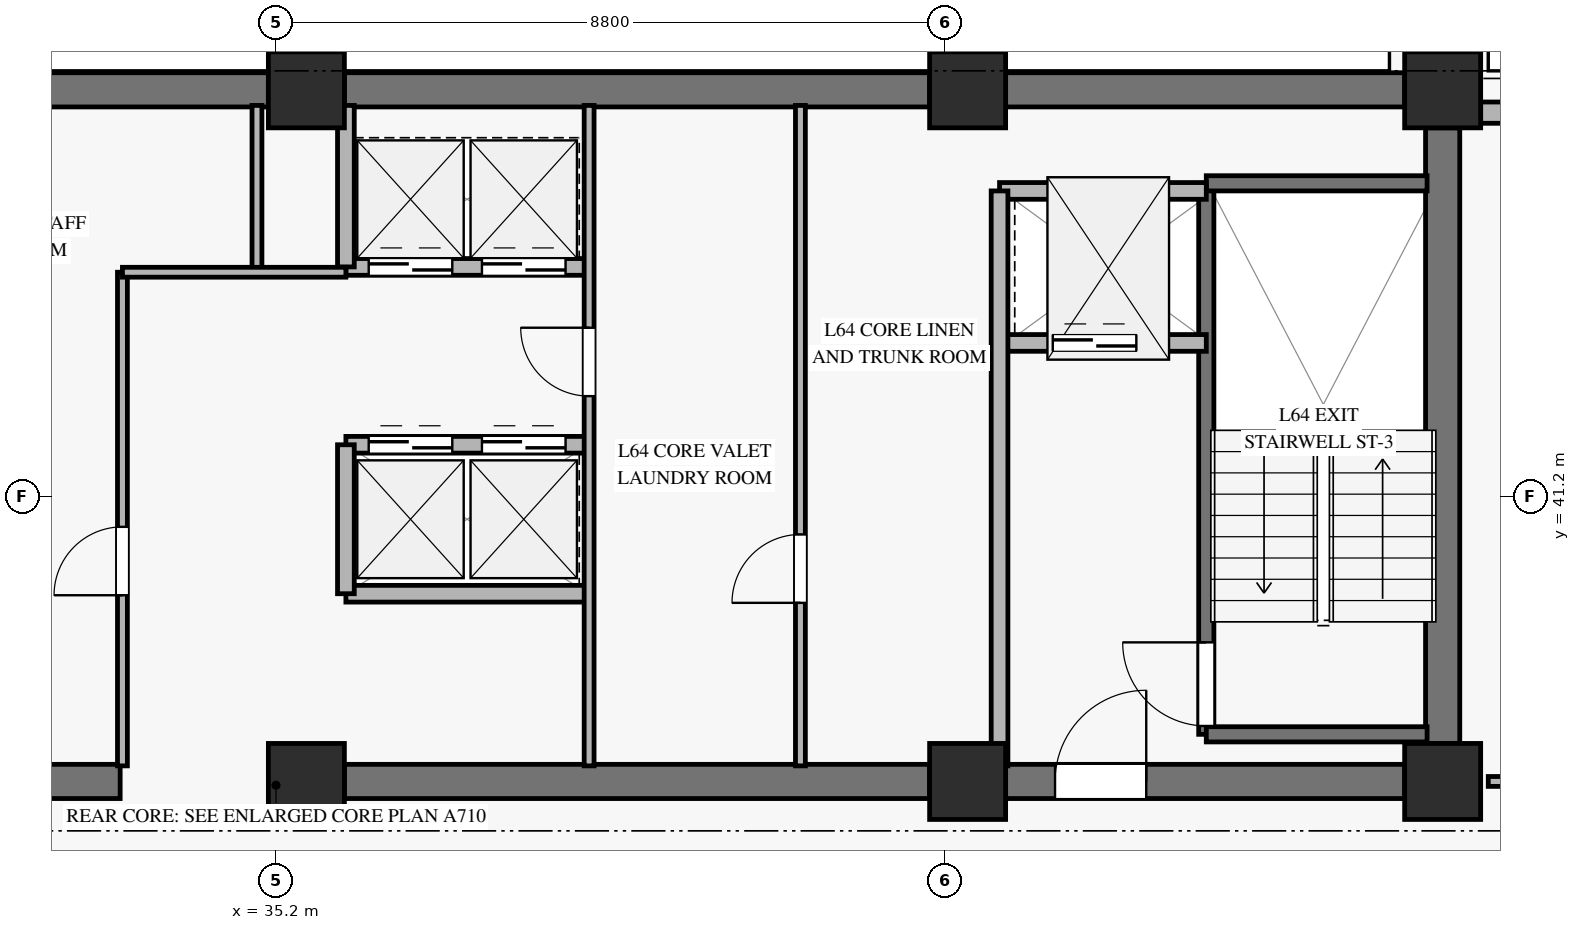
"""IFC4 building model, lengths in metres.
Left out: names, types, materials, properties, quantities, classifications, styles, units other than length and angle.
Written with IfcOpenShell. Run it as: python <this file> out.ifc"""

import sys

from ifc_helpers import new_model, si_unit, direction, frame, frame_2d, origin, origin_2d, place, context, subcontext, project, spatial, rectangle, extrude, source, transform, mapped, element, fill, save


model = new_model("IFC4")
c1 = context("Model", 3, precision=1e-05, world=origin(), true_north=direction((0.0, 1.0)))
c2 = subcontext(c1, "Body", "Model", "MODEL_VIEW")
j1 = project(units=[si_unit("LENGTHUNIT", "METRE"), si_unit("PLANEANGLEUNIT", "RADIAN")], contexts=[c1])
p1 = place(None, origin())
s1 = spatial("IfcSite", under=j1, at=p1, CompositionType="ELEMENT")
p2 = place(p1, origin())
s2 = spatial("IfcBuilding", under=s1, at=p2, CompositionType="ELEMENT")
p3 = place(p2, frame((0.0, 0.0, 251.9)))
s3 = spatial("IfcBuildingStorey", under=s2, at=p3, CompositionType="ELEMENT", Elevation=251.9)
m1 = source(origin(), c2, "Body", "SweptSolid", [
    extrude(rectangle(XDim=1.0, YDim=1.0, at=origin_2d()), origin(), (0.0, 0.0, 1.0), 3.185),
])
for number, where, z_axis, x_axis in (
    (1, (35.6, 37.45, 0.0), (0.0, 0.0, 1.0), (1.0, 0.0, 0.0)),
    (2, (35.6, 46.55, 0.0), (0.0, 0.0, 1.0), (1.0, 0.0, 0.0)),
    (3, (44.3, 37.45, 0.0), (0.0, 0.0, 1.0), (1.0, 0.0, 0.0)),
    (4, (44.3, 46.55, 0.0), (0.0, 0.0, 1.0), (1.0, 0.0, 0.0)),
    (5, (50.55, 37.45, 0.0), (0.0, 0.0, 1.0), (1.0, 0.0, 0.0)),
    (6, (50.55, 46.55, 0.0), (0.0, 0.0, 1.0), (1.0, 0.0, 0.0)),
):
    element("IfcColumn", number, at=place(p3, frame(where, z_axis=z_axis, x_axis=x_axis)), inside=s3, PredefinedType="PILASTER", context=c2, shape_type="MappedRepresentation", body=[
        mapped(m1, transform((0.0, 0.0, 0.0), x_axis=(1.0, 0.0, 0.0), y_axis=(0.0, 1.0, 0.0), z_axis=(0.0, 0.0, 1.0), scale=1.0)),
    ])
p4 = place(p3, frame((31.3, 46.55, 0.0), z_axis=(0.0, 0.0, 1.0), x_axis=(1.0, 0.0, 0.0)))
e7 = element("IfcWall", 7, at=p4, inside=s3, PredefinedType="SHEAR", context=c2, shape_type="SweptSolid", body=[
    extrude(rectangle(XDim=3.8, YDim=0.45, at=frame_2d((1.9, 0.0))), origin(), (0.0, 0.0, 1.0), 3.185),
])
p5 = place(p3, frame((36.1, 46.55, 0.0), z_axis=(0.0, 0.0, 1.0), x_axis=(1.0, 0.0, 0.0)))
e8 = element("IfcWall", 8, at=p5, inside=s3, PredefinedType="SHEAR", context=c2, shape_type="SweptSolid", body=[
    extrude(rectangle(XDim=7.7, YDim=0.45, at=frame_2d((3.85, 0.0))), origin(), (0.0, 0.0, 1.0), 3.185),
])
p6 = place(p3, frame((44.8, 46.55, 0.0), z_axis=(0.0, 0.0, 1.0), x_axis=(1.0, 0.0, 0.0)))
e9 = element("IfcWall", 9, at=p6, inside=s3, PredefinedType="SHEAR", context=c2, shape_type="SweptSolid", body=[
    extrude(rectangle(XDim=5.25, YDim=0.45, at=frame_2d((2.625, 0.0))), origin(), (0.0, 0.0, 1.0), 3.185),
])
p7 = place(p3, frame((31.3, 37.45, 0.0), z_axis=(0.0, 0.0, 1.0), x_axis=(1.0, 0.0, 0.0)))
e10 = element("IfcWall", 10, at=p7, inside=s3, PredefinedType="SHEAR", context=c2, shape_type="SweptSolid", body=[
    extrude(rectangle(XDim=1.85, YDim=0.45, at=frame_2d((0.925, 0.0))), origin(), (0.0, 0.0, 1.0), 3.185),
])
p8 = place(p3, frame((36.1, 37.45, 0.0), z_axis=(0.0, 0.0, 1.0), x_axis=(1.0, 0.0, 0.0)))
e11 = element("IfcWall", 11, at=p8, inside=s3, PredefinedType="SHEAR", context=c2, shape_type="SweptSolid", body=[
    extrude(rectangle(XDim=7.7, YDim=0.45, at=frame_2d((3.85, 0.0))), origin(), (0.0, 0.0, 1.0), 3.185),
])
p9 = place(p3, frame((44.8, 37.45, 0.0), z_axis=(0.0, 0.0, 1.0), x_axis=(1.0, 0.0, 0.0)))
e12 = element("IfcWall", 12, at=p9, inside=s3, PredefinedType="SHEAR", context=c2, shape_type="SweptSolid", body=[
    extrude(rectangle(XDim=5.25, YDim=0.45, at=frame_2d((2.625, 0.0))), origin(), (0.0, 0.0, 1.0), 3.185),
])
p10 = place(p9, frame((0.65, 0.0, 0.0)))
e13 = element("IfcOpeningElement", 13, at=p10, cuts=e12, PredefinedType="OPENING", context=c2, shape_type="SweptSolid", body=[
    extrude(rectangle(XDim=1.2, YDim=2.15, at=frame_2d((0.6, 1.075))), frame((0.0, 0.235, 0.0), z_axis=(0.0, -1.0, 0.0), x_axis=(1.0, 0.0, 0.0)), (0.0, 0.0, 1.0), 0.47),
])
p11 = place(p3, frame((50.55, 37.95, 0.0), z_axis=(0.0, 0.0, 1.0), x_axis=(0.0, 1.0, 0.0)))
e14 = element("IfcWall", 14, at=p11, inside=s3, PredefinedType="SHEAR", context=c2, shape_type="SweptSolid", body=[
    extrude(rectangle(XDim=8.1, YDim=0.45, at=frame_2d((4.05, 0.0))), origin(), (0.0, 0.0, 1.0), 3.185),
])
p12 = place(p3, frame((51.05, 46.25, 0.0), z_axis=(0.0, 0.0, 1.0), x_axis=(1.0, 0.0, 0.0)))
e15 = element("IfcWall", 15, at=p12, inside=s3, PredefinedType="SOLIDWALL", context=c2, shape_type="SweptSolid", body=[
    extrude(rectangle(XDim=8.122, YDim=0.28, at=frame_2d((4.061, 0.0))), origin(), (0.0, 0.0, 1.0), 2.815),
])
p13 = place(p12, frame((3.261, 0.0, 0.45)))
e16 = element("IfcOpeningElement", 16, at=p13, cuts=e15, PredefinedType="OPENING", context=c2, shape_type="SweptSolid", body=[
    extrude(rectangle(XDim=1.6, YDim=2.0, at=frame_2d((0.8, 1.0))), frame((0.0, 0.15, 0.0), z_axis=(0.0, -1.0, 0.0), x_axis=(1.0, 0.0, 0.0)), (0.0, 0.0, 1.0), 0.3),
])
p14 = place(p3, frame((47.44, 38.07, 0.0), z_axis=(0.0, 0.0, 1.0), x_axis=(0.0, 1.0, 0.0)))
e17 = element("IfcWall", 17, at=p14, inside=s3, PredefinedType="SOLIDWALL", context=c2, shape_type="SweptSolid", body=[
    extrude(rectangle(XDim=7.25, YDim=0.2, at=frame_2d((3.625, 0.0))), origin(), (0.0, 0.0, 1.0), 3.4),
])
p15 = place(p14, frame((0.11, 0.0, 0.0)))
e18 = element("IfcOpeningElement", 18, at=p15, cuts=e17, PredefinedType="OPENING", context=c2, shape_type="SweptSolid", body=[
    extrude(rectangle(XDim=1.1, YDim=2.15, at=frame_2d((0.55, 1.075))), frame((0.0, 0.11, 0.0), z_axis=(0.0, -1.0, 0.0), x_axis=(1.0, 0.0, 0.0)), (0.0, 0.0, 1.0), 0.22),
])
for number, where, z_axis, x_axis in (
    (19, (47.44, 45.32, 0.0), (0.0, 0.0, 1.0), (1.0, 0.0, 0.0)),
    (20, (47.44, 38.07, 0.0), (0.0, 0.0, 1.0), (1.0, 0.0, 0.0)),
):
    element("IfcWall", number, at=place(p3, frame(where, z_axis=z_axis, x_axis=x_axis)), inside=s3, PredefinedType="SOLIDWALL", context=c2, shape_type="SweptSolid", body=[
        extrude(rectangle(XDim=2.905, YDim=0.2, at=frame_2d((1.453, 0.0))), origin(), (0.0, 0.0, 1.0), 3.4),
    ])
p16 = place(p3, frame((44.72, 43.22, 0.0), z_axis=(0.0, 0.0, 1.0), x_axis=(1.0, 0.0, 0.0)))
e21 = element("IfcWall", 21, at=p16, inside=s3, PredefinedType="SOLIDWALL", context=c2, shape_type="SweptSolid", body=[
    extrude(rectangle(XDim=2.72, YDim=0.22, at=frame_2d((1.36, 0.0))), origin(), (0.0, 0.0, 1.0), 3.185),
])
p17 = place(p16, frame((0.7, 0.0, 0.0)))
e22 = element("IfcOpeningElement", 22, at=p17, cuts=e21, PredefinedType="OPENING", context=c2, shape_type="SweptSolid", body=[
    extrude(rectangle(XDim=1.1, YDim=2.2, at=frame_2d((0.55, 1.1))), frame((0.0, 0.12, 0.0), z_axis=(0.0, -1.0, 0.0), x_axis=(1.0, 0.0, 0.0)), (0.0, 0.0, 1.0), 0.24),
])
p18 = place(p3, frame((44.72, 45.22, 0.0), z_axis=(0.0, 0.0, 1.0), x_axis=(1.0, 0.0, 0.0)))
e23 = element("IfcWall", 23, at=p18, inside=s3, PredefinedType="SOLIDWALL", context=c2, shape_type="SweptSolid", body=[
    extrude(rectangle(XDim=2.72, YDim=0.22, at=frame_2d((1.36, 0.0))), origin(), (0.0, 0.0, 1.0), 3.185),
])
p19 = place(p3, frame((44.72, 37.655, 0.0), z_axis=(0.0, 0.0, 1.0), x_axis=(0.0, 1.0, 0.0)))
e24 = element("IfcWall", 24, at=p19, inside=s3, PredefinedType="SOLIDWALL", context=c2, shape_type="SweptSolid", body=[
    extrude(rectangle(XDim=7.565, YDim=0.22, at=frame_2d((3.782, 0.0))), origin(), (0.0, 0.0, 1.0), 3.185),
])
p20 = place(p3, frame((36.12, 44.22, 0.0), z_axis=(0.0, 0.0, 1.0), x_axis=(1.0, 0.0, 0.0)))
e25 = element("IfcWall", 25, at=p20, inside=s3, PredefinedType="SOLIDWALL", context=c2, shape_type="SweptSolid", body=[
    extrude(rectangle(XDim=3.2, YDim=0.22, at=frame_2d((1.6, 0.0))), origin(), (0.0, 0.0, 1.0), 3.185),
])
p21 = place(p20, frame((0.3, 0.0, 0.0)))
e26 = element("IfcOpeningElement", 26, at=p21, cuts=e25, PredefinedType="OPENING", context=c2, shape_type="SweptSolid", body=[
    extrude(rectangle(XDim=1.1, YDim=2.2, at=frame_2d((0.55, 1.1))), frame((0.0, 0.12, 0.0), z_axis=(0.0, -1.0, 0.0), x_axis=(1.0, 0.0, 0.0)), (0.0, 0.0, 1.0), 0.24),
])
p22 = place(p20, frame((1.79, 0.0, 0.0)))
e27 = element("IfcOpeningElement", 27, at=p22, cuts=e25, PredefinedType="OPENING", context=c2, shape_type="SweptSolid", body=[
    extrude(rectangle(XDim=1.1, YDim=2.2, at=frame_2d((0.55, 1.1))), frame((0.0, 0.12, 0.0), z_axis=(0.0, -1.0, 0.0), x_axis=(1.0, 0.0, 0.0)), (0.0, 0.0, 1.0), 0.24),
])
p23 = place(p3, frame((36.12, 41.88, 0.0), z_axis=(0.0, 0.0, 1.0), x_axis=(1.0, 0.0, 0.0)))
e28 = element("IfcWall", 28, at=p23, inside=s3, PredefinedType="SOLIDWALL", context=c2, shape_type="SweptSolid", body=[
    extrude(rectangle(XDim=3.2, YDim=0.22, at=frame_2d((1.6, 0.0))), origin(), (0.0, 0.0, 1.0), 3.185),
])
p24 = place(p23, frame((0.3, 0.0, 0.0)))
e29 = element("IfcOpeningElement", 29, at=p24, cuts=e28, PredefinedType="OPENING", context=c2, shape_type="SweptSolid", body=[
    extrude(rectangle(XDim=1.1, YDim=2.2, at=frame_2d((0.55, 1.1))), frame((0.0, 0.12, 0.0), z_axis=(0.0, -1.0, 0.0), x_axis=(1.0, 0.0, 0.0)), (0.0, 0.0, 1.0), 0.24),
])
p25 = place(p23, frame((1.79, 0.0, 0.0)))
e30 = element("IfcOpeningElement", 30, at=p25, cuts=e28, PredefinedType="OPENING", context=c2, shape_type="SweptSolid", body=[
    extrude(rectangle(XDim=1.1, YDim=2.2, at=frame_2d((0.55, 1.1))), frame((0.0, 0.12, 0.0), z_axis=(0.0, -1.0, 0.0), x_axis=(1.0, 0.0, 0.0)), (0.0, 0.0, 1.0), 0.24),
])
p26 = place(p3, frame((36.12, 39.92, 0.0), z_axis=(0.0, 0.0, 1.0), x_axis=(1.0, 0.0, 0.0)))
e31 = element("IfcWall", 31, at=p26, inside=s3, PredefinedType="SOLIDWALL", context=c2, shape_type="SweptSolid", body=[
    extrude(rectangle(XDim=3.2, YDim=0.22, at=frame_2d((1.6, 0.0))), origin(), (0.0, 0.0, 1.0), 3.185),
])
p27 = place(p3, frame((36.12, 39.92, 0.0), z_axis=(0.0, 0.0, 1.0), x_axis=(0.0, 1.0, 0.0)))
e32 = element("IfcWall", 32, at=p27, inside=s3, PredefinedType="SOLIDWALL", context=c2, shape_type="SweptSolid", body=[
    extrude(rectangle(XDim=1.96, YDim=0.22, at=frame_2d((0.98, 0.0))), origin(), (0.0, 0.0, 1.0), 3.185),
])
p28 = place(p3, frame((36.12, 44.22, 0.0), z_axis=(0.0, 0.0, 1.0), x_axis=(0.0, 1.0, 0.0)))
e33 = element("IfcWall", 33, at=p28, inside=s3, PredefinedType="SOLIDWALL", context=c2, shape_type="SweptSolid", body=[
    extrude(rectangle(XDim=2.125, YDim=0.22, at=frame_2d((1.062, 0.0))), origin(), (0.0, 0.0, 1.0), 3.185),
])
p29 = place(p3, frame((33.18, 37.655, 0.0), z_axis=(0.0, 0.0, 1.0), x_axis=(0.0, 1.0, 0.0)))
e34 = element("IfcWall", 34, at=p29, inside=s3, PredefinedType="PARTITIONING", context=c2, shape_type="SweptSolid", body=[
    extrude(rectangle(XDim=6.495, YDim=0.13, at=frame_2d((3.248, 0.0))), origin(), (0.0, 0.0, 1.0), 2.27),
])
p30 = place(p29, frame((2.245, 0.0, 0.0)))
e35 = element("IfcOpeningElement", 35, at=p30, cuts=e34, PredefinedType="OPENING", context=c2, shape_type="SweptSolid", body=[
    extrude(rectangle(XDim=0.9, YDim=2.1, at=frame_2d((0.45, 1.05))), frame((0.0, 0.075, 0.0), z_axis=(0.0, -1.0, 0.0), x_axis=(1.0, 0.0, 0.0)), (0.0, 0.0, 1.0), 0.15),
])
p31 = place(p3, frame((34.95, 44.15, 0.0), z_axis=(0.0, 0.0, 1.0), x_axis=(0.0, 1.0, 0.0)))
e36 = element("IfcWall", 36, at=p31, inside=s3, PredefinedType="PARTITIONING", context=c2, shape_type="SweptSolid", body=[
    extrude(rectangle(XDim=2.195, YDim=0.13, at=frame_2d((1.098, 0.0))), origin(), (0.0, 0.0, 1.0), 3.185),
])
p32 = place(p3, frame((33.18, 44.15, 0.0), z_axis=(0.0, 0.0, 1.0), x_axis=(1.0, 0.0, 0.0)))
e37 = element("IfcWall", 37, at=p32, inside=s3, PredefinedType="PARTITIONING", context=c2, shape_type="SweptSolid", body=[
    extrude(rectangle(XDim=2.94, YDim=0.13, at=frame_2d((1.47, 0.0))), origin(), (0.0, 0.0, 1.0), 2.47),
])
p33 = place(p3, frame((39.32, 37.655, 0.0), z_axis=(0.0, 0.0, 1.0), x_axis=(0.0, 1.0, 0.0)))
e38 = element("IfcWall", 38, at=p33, inside=s3, PredefinedType="PARTITIONING", context=c2, shape_type="SweptSolid", body=[
    extrude(rectangle(XDim=8.69, YDim=0.13, at=frame_2d((4.345, 0.0))), origin(), (0.0, 0.0, 1.0), 3.185),
])
p34 = place(p33, frame((4.865, 0.0, 0.0)))
e39 = element("IfcOpeningElement", 39, at=p34, cuts=e38, PredefinedType="OPENING", context=c2, shape_type="SweptSolid", body=[
    extrude(rectangle(XDim=0.9, YDim=2.1, at=frame_2d((0.45, 1.05))), frame((0.0, 0.075, 0.0), z_axis=(0.0, -1.0, 0.0), x_axis=(1.0, 0.0, 0.0)), (0.0, 0.0, 1.0), 0.15),
])
p35 = place(p3, frame((42.1, 37.655, 0.0), z_axis=(0.0, 0.0, 1.0), x_axis=(0.0, 1.0, 0.0)))
e40 = element("IfcWall", 40, at=p35, inside=s3, PredefinedType="PARTITIONING", context=c2, shape_type="SweptSolid", body=[
    extrude(rectangle(XDim=8.69, YDim=0.13, at=frame_2d((4.345, 0.0))), origin(), (0.0, 0.0, 1.0), 3.185),
])
p36 = place(p35, frame((2.145, 0.0, 0.0)))
e41 = element("IfcOpeningElement", 41, at=p36, cuts=e40, PredefinedType="OPENING", context=c2, shape_type="SweptSolid", body=[
    extrude(rectangle(XDim=0.9, YDim=2.1, at=frame_2d((0.45, 1.05))), frame((0.0, 0.075, 0.0), z_axis=(0.0, -1.0, 0.0), x_axis=(1.0, 0.0, 0.0)), (0.0, 0.0, 1.0), 0.15),
])
p37 = place(p3, frame((51.15, 37.45, 0.0), z_axis=(0.0, 0.0, 1.0), x_axis=(1.0, 0.0, 0.0)))
e42 = element("IfcWall", 42, at=p37, inside=s3, PredefinedType="PARTITIONING", context=c2, shape_type="SweptSolid", body=[
    extrude(rectangle(XDim=10.887, YDim=0.13, at=frame_2d((5.444, 0.0))), origin(), (0.0, 0.0, 1.0), 2.82),
])
p38 = place(p37, frame((0.5, 0.0, 0.0)))
e43 = element("IfcOpeningElement", 43, at=p38, cuts=e42, PredefinedType="OPENING", context=c2, shape_type="SweptSolid", body=[
    extrude(rectangle(XDim=0.9, YDim=2.1, at=frame_2d((0.45, 1.05))), frame((0.0, 0.075, 0.0), z_axis=(0.0, -1.0, 0.0), x_axis=(1.0, 0.0, 0.0)), (0.0, 0.0, 1.0), 0.15),
])
p39 = place(p37, frame((8.061, 0.0, 0.0)))
e44 = element("IfcOpeningElement", 44, at=p39, cuts=e42, PredefinedType="OPENING", context=c2, shape_type="SweptSolid", body=[
    extrude(rectangle(XDim=0.95, YDim=2.1, at=frame_2d((0.475, 1.05))), frame((0.0, 0.075, 0.0), z_axis=(0.0, -1.0, 0.0), x_axis=(1.0, 0.0, 0.0)), (0.0, 0.0, 1.0), 0.15),
])
m2 = source(origin(), c2, "Body", "SweptSolid", [
    extrude(rectangle(XDim=1.1, YDim=2.15, at=frame_2d((0.55, 1.075))), frame((0.0, 0.025, 0.0), z_axis=(0.0, -1.0, 0.0), x_axis=(1.0, 0.0, 0.0)), (0.0, 0.0, 1.0), 0.05),
])
p40 = place(p15, origin())
e45 = element("IfcDoor", 45, at=p40, inside=s3, OperationType="SINGLE_SWING_RIGHT", PredefinedType="DOOR", context=c2, shape_type="MappedRepresentation", body=[
    mapped(m2, transform((0.0, 0.0, 0.0), x_axis=(1.0, 0.0, 0.0), y_axis=(0.0, 1.0, 0.0), z_axis=(0.0, 0.0, 1.0), scale=1.0)),
])
fill(e18, e45)
m3 = source(origin(), c2, "Body", "SweptSolid", [
    extrude(rectangle(XDim=1.1, YDim=2.2, at=frame_2d((0.55, 1.1))), frame((0.0, 0.025, 0.0), z_axis=(0.0, -1.0, 0.0), x_axis=(1.0, 0.0, 0.0)), (0.0, 0.0, 1.0), 0.05),
])
p41 = place(p17, origin())
e46 = element("IfcDoor", 46, at=p41, inside=s3, OperationType="SLIDING_TO_LEFT", PredefinedType="DOOR", context=c2, shape_type="MappedRepresentation", body=[
    mapped(m3, transform((0.0, 0.0, 0.0), x_axis=(1.0, 0.0, 0.0), y_axis=(0.0, 1.0, 0.0), z_axis=(0.0, 0.0, 1.0), scale=1.0)),
])
fill(e22, e46)
m4 = source(origin(), c2, "Body", "SweptSolid", [
    extrude(rectangle(XDim=1.2, YDim=2.15, at=frame_2d((0.6, 1.075))), frame((0.0, 0.025, 0.0), z_axis=(0.0, -1.0, 0.0), x_axis=(1.0, 0.0, 0.0)), (0.0, 0.0, 1.0), 0.05),
])
p42 = place(p10, origin())
e47 = element("IfcDoor", 47, at=p42, inside=s3, OperationType="SINGLE_SWING_RIGHT", PredefinedType="DOOR", context=c2, shape_type="MappedRepresentation", body=[
    mapped(m4, transform((0.0, 0.0, 0.0), x_axis=(1.0, 0.0, 0.0), y_axis=(0.0, 1.0, 0.0), z_axis=(0.0, 0.0, 1.0), scale=1.0)),
])
fill(e13, e47)
p43 = place(p21, origin())
e48 = element("IfcDoor", 48, at=p43, inside=s3, OperationType="SLIDING_TO_LEFT", PredefinedType="DOOR", context=c2, shape_type="MappedRepresentation", body=[
    mapped(m3, transform((0.0, 0.0, 0.0), x_axis=(1.0, 0.0, 0.0), y_axis=(0.0, 1.0, 0.0), z_axis=(0.0, 0.0, 1.0), scale=1.0)),
])
fill(e26, e48)
p44 = place(p22, origin())
e49 = element("IfcDoor", 49, at=p44, inside=s3, OperationType="SLIDING_TO_LEFT", PredefinedType="DOOR", context=c2, shape_type="MappedRepresentation", body=[
    mapped(m3, transform((0.0, 0.0, 0.0), x_axis=(1.0, 0.0, 0.0), y_axis=(0.0, 1.0, 0.0), z_axis=(0.0, 0.0, 1.0), scale=1.0)),
])
fill(e27, e49)
p45 = place(p24, origin())
e50 = element("IfcDoor", 50, at=p45, inside=s3, OperationType="SLIDING_TO_LEFT", PredefinedType="DOOR", context=c2, shape_type="MappedRepresentation", body=[
    mapped(m3, transform((0.0, 0.0, 0.0), x_axis=(1.0, 0.0, 0.0), y_axis=(0.0, 1.0, 0.0), z_axis=(0.0, 0.0, 1.0), scale=1.0)),
])
fill(e29, e50)
p46 = place(p25, origin())
e51 = element("IfcDoor", 51, at=p46, inside=s3, OperationType="SLIDING_TO_LEFT", PredefinedType="DOOR", context=c2, shape_type="MappedRepresentation", body=[
    mapped(m3, transform((0.0, 0.0, 0.0), x_axis=(1.0, 0.0, 0.0), y_axis=(0.0, 1.0, 0.0), z_axis=(0.0, 0.0, 1.0), scale=1.0)),
])
fill(e30, e51)
m5 = source(origin(), c2, "Body", "SweptSolid", [
    extrude(rectangle(XDim=0.9, YDim=2.1, at=frame_2d((0.45, 1.05))), frame((0.0, 0.025, 0.0), z_axis=(0.0, -1.0, 0.0), x_axis=(1.0, 0.0, 0.0)), (0.0, 0.0, 1.0), 0.05),
])
p47 = place(p30, origin())
e52 = element("IfcDoor", 52, at=p47, inside=s3, OperationType="SINGLE_SWING_LEFT", PredefinedType="DOOR", context=c2, shape_type="MappedRepresentation", body=[
    mapped(m5, transform((0.0, 0.0, 0.0), x_axis=(1.0, 0.0, 0.0), y_axis=(0.0, 1.0, 0.0), z_axis=(0.0, 0.0, 1.0), scale=1.0)),
])
fill(e35, e52)
p48 = place(p34, origin())
e53 = element("IfcDoor", 53, at=p48, inside=s3, OperationType="SINGLE_SWING_RIGHT", PredefinedType="DOOR", context=c2, shape_type="MappedRepresentation", body=[
    mapped(m5, transform((0.0, 0.0, 0.0), x_axis=(1.0, 0.0, 0.0), y_axis=(0.0, 1.0, 0.0), z_axis=(0.0, 0.0, 1.0), scale=1.0)),
])
fill(e39, e53)
p49 = place(p36, origin())
e54 = element("IfcDoor", 54, at=p49, inside=s3, OperationType="SINGLE_SWING_LEFT", PredefinedType="DOOR", context=c2, shape_type="MappedRepresentation", body=[
    mapped(m5, transform((0.0, 0.0, 0.0), x_axis=(1.0, 0.0, 0.0), y_axis=(0.0, 1.0, 0.0), z_axis=(0.0, 0.0, 1.0), scale=1.0)),
])
fill(e41, e54)
save(model, sys.argv[1])
